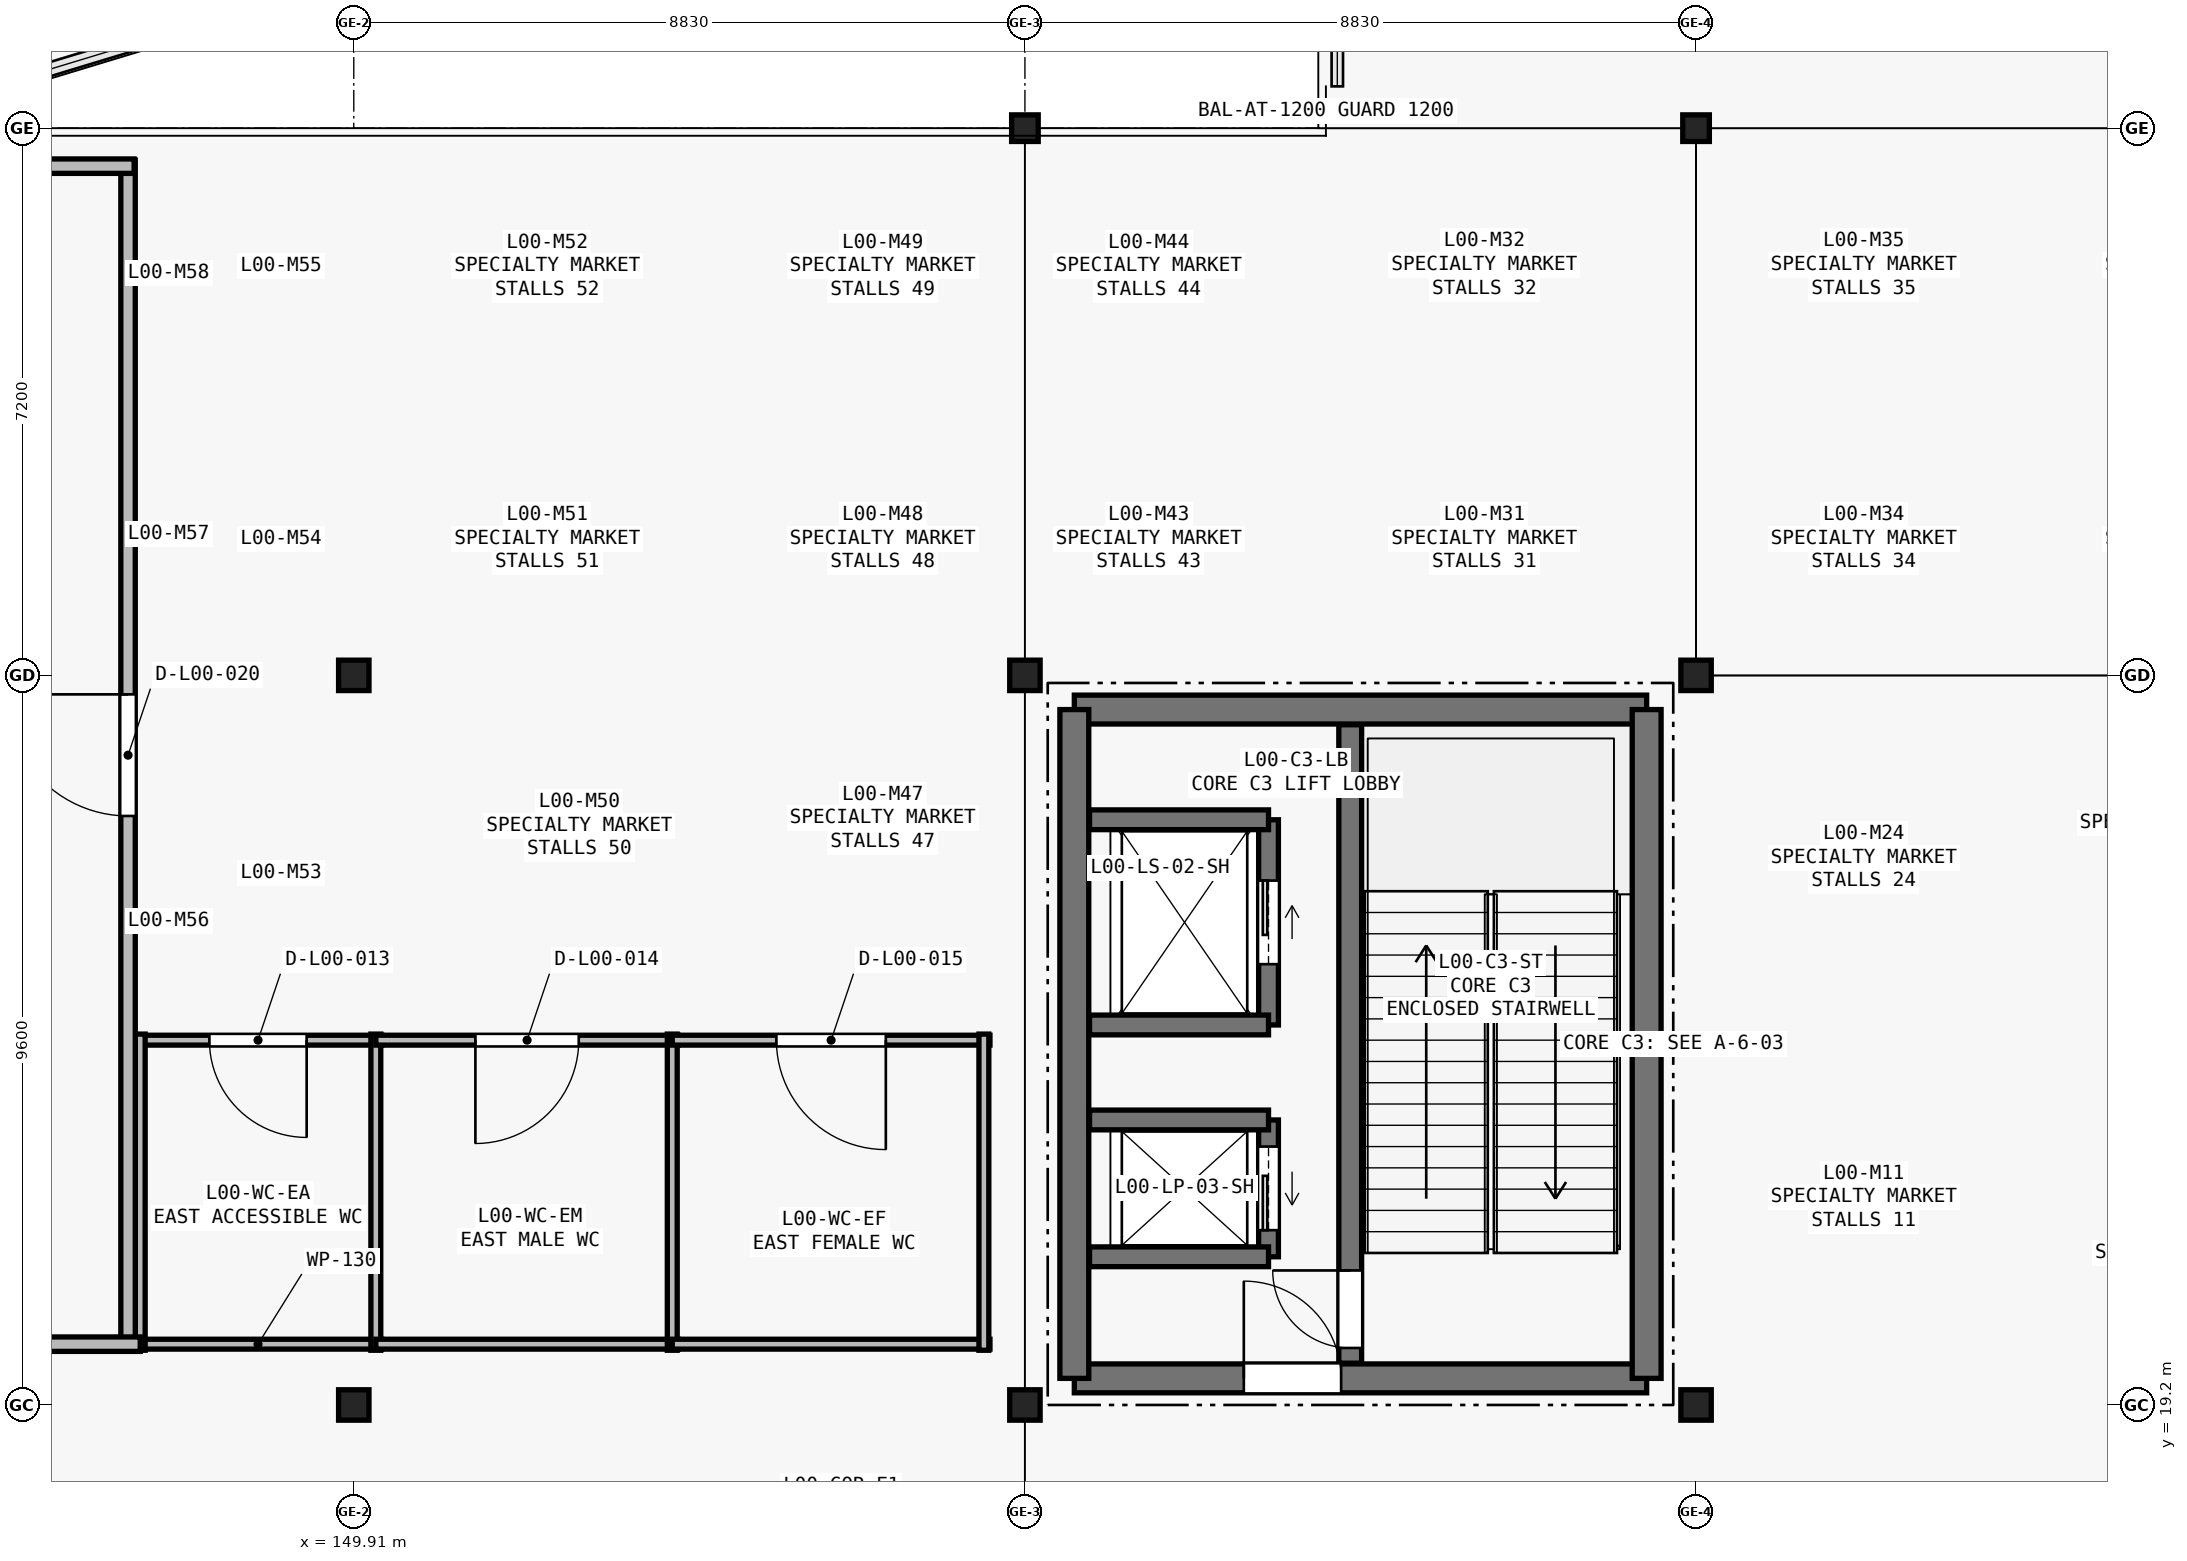
"""IFC4 building model, lengths in metres.
Left out: names, types, materials, properties, quantities, classifications, styles, units other than length and angle.
Written with IfcOpenShell. Run it as: python <this file> out.ifc"""

import sys

from ifc_helpers import new_model, si_unit, direction, frame, frame_2d, origin, origin_2d, place, context, subcontext, project, spatial, rectangle, hollow_rectangle, i_section, extrude, element, fill, save


model = new_model("IFC4")
c1 = context("Model", 3, precision=1e-05, world=origin(), true_north=direction((0.0, 1.0)))
c2 = subcontext(c1, "Body", "Model", "MODEL_VIEW")
j1 = project(units=[si_unit("LENGTHUNIT", "METRE"), si_unit("PLANEANGLEUNIT", "RADIAN")], contexts=[c1])
p1 = place(None, origin())
s1 = spatial("IfcSite", under=j1, at=p1, CompositionType="ELEMENT")
p2 = place(p1, origin())
s2 = spatial("IfcBuilding", under=s1, at=p2, CompositionType="ELEMENT")
p3 = place(p2, origin())
s3 = spatial("IfcBuildingStorey", under=s2, at=p3, CompositionType="ELEMENT", Elevation=0.0)
for number, where, z_axis, x_axis in (
    (1, (149.91, 19.2, 0.0), (0.0, 0.0, 1.0), (1.0, 0.0, 0.0)),
    (2, (149.91, 28.8, 0.0), (0.0, 0.0, 1.0), (1.0, 0.0, 0.0)),
    (3, (158.74, 19.2, 0.0), (0.0, 0.0, 1.0), (1.0, 0.0, 0.0)),
    (4, (158.74, 28.8, 0.0), (0.0, 0.0, 1.0), (1.0, 0.0, 0.0)),
):
    element("IfcColumn", number, at=place(p3, frame(where, z_axis=z_axis, x_axis=x_axis)), inside=s3, PredefinedType="COLUMN", context=c2, shape_type="SweptSolid", body=[
        extrude(i_section(OverallWidth=0.4, OverallDepth=0.4, WebThickness=0.013, FlangeThickness=0.021, FilletRadius=0.022, at=origin_2d()), origin(), (0.0, 0.0, 1.0), 6.0),
    ])
p4 = place(p3, frame((158.74, 36.0, 0.0), z_axis=(0.0, 0.0, 1.0), x_axis=(1.0, 0.0, 0.0)))
e5 = element("IfcColumn", 5, at=p4, inside=s3, PredefinedType="COLUMN", context=c2, shape_type="SweptSolid", body=[
    extrude(hollow_rectangle(XDim=0.35, YDim=0.35, WallThickness=0.012, InnerFilletRadius=0.012, OuterFilletRadius=0.016, at=origin_2d()), origin(), (0.0, 0.0, 1.0), 6.0),
])
for number, where, z_axis, x_axis in (
    (6, (167.57, 19.2, 0.0), (0.0, 0.0, 1.0), (1.0, 0.0, 0.0)),
    (7, (167.57, 28.8, 0.0), (0.0, 0.0, 1.0), (1.0, 0.0, 0.0)),
):
    element("IfcColumn", number, at=place(p3, frame(where, z_axis=z_axis, x_axis=x_axis)), inside=s3, PredefinedType="COLUMN", context=c2, shape_type="SweptSolid", body=[
        extrude(i_section(OverallWidth=0.4, OverallDepth=0.4, WebThickness=0.013, FlangeThickness=0.021, FilletRadius=0.022, at=origin_2d()), origin(), (0.0, 0.0, 1.0), 6.0),
    ])
p5 = place(p3, frame((167.57, 36.0, 0.0), z_axis=(0.0, 0.0, 1.0), x_axis=(1.0, 0.0, 0.0)))
e8 = element("IfcColumn", 8, at=p5, inside=s3, PredefinedType="COLUMN", context=c2, shape_type="SweptSolid", body=[
    extrude(i_section(OverallWidth=0.35, OverallDepth=0.35, WebThickness=0.012, FlangeThickness=0.019, FilletRadius=0.02, at=origin_2d()), origin(), (0.0, 0.0, 1.0), 6.0),
])
p6 = place(p3, frame((159.39, 19.55, 0.0), z_axis=(0.0, 0.0, 1.0), x_axis=(1.0, 0.0, 0.0)))
e9 = element("IfcWall", 9, at=p6, inside=s3, PredefinedType="SHEAR", context=c2, shape_type="SweptSolid", body=[
    extrude(rectangle(XDim=7.53, YDim=0.38, at=frame_2d((3.765, 0.0))), origin(), (0.0, 0.0, 1.0), 6.0),
])
p7 = place(p6, frame((2.23, 0.0, 0.0)))
e10 = element("IfcOpeningElement", 10, at=p7, cuts=e9, PredefinedType="OPENING", context=c2, shape_type="SweptSolid", body=[
    extrude(rectangle(XDim=1.28, YDim=2.15, at=frame_2d((0.64, 1.075))), frame((0.0, 0.2, 0.0), z_axis=(0.0, -1.0, 0.0), x_axis=(1.0, 0.0, 0.0)), (0.0, 0.0, 1.0), 0.4),
])
p8 = place(p3, frame((166.92, 28.35, 0.0), z_axis=(0.0, 0.0, 1.0), x_axis=(-1.0, 0.0, 0.0)))
e11 = element("IfcWall", 11, at=p8, inside=s3, PredefinedType="SHEAR", context=c2, shape_type="SweptSolid", body=[
    extrude(rectangle(XDim=7.53, YDim=0.38, at=frame_2d((3.765, 0.0))), origin(), (0.0, 0.0, 1.0), 6.0),
])
for number, where, z_axis, x_axis in (
    (12, (159.39, 28.35, 0.0), (0.0, 0.0, 1.0), (0.0, -1.0, 0.0)),
    (13, (166.92, 19.55, 0.0), (0.0, 0.0, 1.0), (0.0, 1.0, 0.0)),
):
    element("IfcWall", number, at=place(p3, frame(where, z_axis=z_axis, x_axis=x_axis)), inside=s3, PredefinedType="SHEAR", context=c2, shape_type="SweptSolid", body=[
        extrude(rectangle(XDim=8.8, YDim=0.38, at=frame_2d((4.4, 0.0))), origin(), (0.0, 0.0, 1.0), 6.0),
    ])
p9 = place(p3, frame((163.02, 19.75, 0.0), z_axis=(0.0, 0.0, 1.0), x_axis=(0.0, 1.0, 0.0)))
e14 = element("IfcWall", 14, at=p9, inside=s3, PredefinedType="SHEAR", context=c2, shape_type="SweptSolid", body=[
    extrude(rectangle(XDim=8.4, YDim=0.3, at=frame_2d((4.2, 0.0))), origin(), (0.0, 0.0, 1.0), 6.0),
])
p10 = place(p9, frame((0.2, 0.0, 0.0)))
e15 = element("IfcOpeningElement", 15, at=p10, cuts=e14, PredefinedType="OPENING", context=c2, shape_type="SweptSolid", body=[
    extrude(rectangle(XDim=1.02, YDim=2.1, at=frame_2d((0.51, 1.05))), frame((0.0, 0.16, 0.0), z_axis=(0.0, -1.0, 0.0), x_axis=(1.0, 0.0, 0.0)), (0.0, 0.0, 1.0), 0.32),
])
p11 = place(p3, frame((161.945, 21.15, 0.0), z_axis=(0.0, 0.0, 1.0), x_axis=(0.0, 1.0, 0.0)))
e16 = element("IfcWall", 16, at=p11, inside=s3, PredefinedType="SHEAR", context=c2, shape_type="SweptSolid", body=[
    extrude(rectangle(XDim=1.8, YDim=0.26, at=frame_2d((0.9, 0.0))), origin(), (0.0, 0.0, 1.0), 6.0),
])
p12 = place(p11, frame((0.35, 0.0, 0.0)))
e17 = element("IfcOpeningElement", 17, at=p12, cuts=e16, PredefinedType="OPENING", context=c2, shape_type="SweptSolid", body=[
    extrude(rectangle(XDim=1.1, YDim=2.15, at=frame_2d((0.55, 1.075))), frame((0.0, 0.14, 0.0), z_axis=(0.0, -1.0, 0.0), x_axis=(1.0, 0.0, 0.0)), (0.0, 0.0, 1.0), 0.28),
])
for number, where, z_axis, x_axis in (
    (18, (159.59, 21.15, 0.0), (0.0, 0.0, 1.0), (1.0, 0.0, 0.0)),
    (19, (159.59, 22.95, 0.0), (0.0, 0.0, 1.0), (1.0, 0.0, 0.0)),
):
    element("IfcWall", number, at=place(p3, frame(where, z_axis=z_axis, x_axis=x_axis)), inside=s3, PredefinedType="SHEAR", context=c2, shape_type="SweptSolid", body=[
        extrude(rectangle(XDim=2.355, YDim=0.26, at=frame_2d((1.177, 0.0))), origin(), (0.0, 0.0, 1.0), 6.0),
    ])
p13 = place(p3, frame((161.945, 24.2, 0.0), z_axis=(0.0, 0.0, 1.0), x_axis=(0.0, 1.0, 0.0)))
e20 = element("IfcWall", 20, at=p13, inside=s3, PredefinedType="SHEAR", context=c2, shape_type="SweptSolid", body=[
    extrude(rectangle(XDim=2.7, YDim=0.26, at=frame_2d((1.35, 0.0))), origin(), (0.0, 0.0, 1.0), 6.0),
])
p14 = place(p13, frame((0.8, 0.0, 0.0)))
e21 = element("IfcOpeningElement", 21, at=p14, cuts=e20, PredefinedType="OPENING", context=c2, shape_type="SweptSolid", body=[
    extrude(rectangle(XDim=1.1, YDim=2.15, at=frame_2d((0.55, 1.075))), frame((0.0, 0.14, 0.0), z_axis=(0.0, -1.0, 0.0), x_axis=(1.0, 0.0, 0.0)), (0.0, 0.0, 1.0), 0.28),
])
for number, where, z_axis, x_axis in (
    (22, (159.59, 24.2, 0.0), (0.0, 0.0, 1.0), (1.0, 0.0, 0.0)),
    (23, (159.59, 26.9, 0.0), (0.0, 0.0, 1.0), (1.0, 0.0, 0.0)),
):
    element("IfcWall", number, at=place(p3, frame(where, z_axis=z_axis, x_axis=x_axis)), inside=s3, PredefinedType="SHEAR", context=c2, shape_type="SweptSolid", body=[
        extrude(rectangle(XDim=2.355, YDim=0.26, at=frame_2d((1.177, 0.0))), origin(), (0.0, 0.0, 1.0), 6.0),
    ])
p15 = place(p3, frame((150.28, 24.0, 0.0), z_axis=(0.0, 0.0, 1.0), x_axis=(-1.0, 0.0, 0.0)))
e24 = element("IfcWall", 24, at=p15, inside=s3, PredefinedType="PARTITIONING", context=c2, shape_type="SweptSolid", body=[
    extrude(rectangle(XDim=3.26, YDim=0.13, at=frame_2d((1.63, 0.0))), origin(), (0.0, 0.0, 1.0), 5.52),
])
p16 = place(p15, frame((0.99, 0.0, 0.0)))
e25 = element("IfcOpeningElement", 25, at=p16, cuts=e24, PredefinedType="OPENING", context=c2, shape_type="SweptSolid", body=[
    extrude(rectangle(XDim=1.28, YDim=2.28, at=frame_2d((0.64, 1.14))), frame((0.0, 0.075, 0.0), z_axis=(0.0, -1.0, 0.0), x_axis=(1.0, 0.0, 0.0)), (0.0, 0.0, 1.0), 0.15),
])
p17 = place(p3, frame((147.02, 20.0, 0.0), z_axis=(0.0, 0.0, 1.0), x_axis=(1.0, 0.0, 0.0)))
e26 = element("IfcWall", 26, at=p17, inside=s3, PredefinedType="PARTITIONING", context=c2, shape_type="SweptSolid", body=[
    extrude(rectangle(XDim=3.26, YDim=0.13, at=frame_2d((1.63, 0.0))), origin(), (0.0, 0.0, 1.0), 5.52),
])
p18 = place(p3, frame((150.2, 19.92, 0.0), z_axis=(0.0, 0.0, 1.0), x_axis=(0.0, 1.0, 0.0)))
e27 = element("IfcWall", 27, at=p18, inside=s3, PredefinedType="PARTITIONING", context=c2, shape_type="SweptSolid", body=[
    extrude(rectangle(XDim=4.16, YDim=0.13, at=frame_2d((2.08, 0.0))), origin(), (0.0, 0.0, 1.0), 5.52),
])
p19 = place(p3, frame((147.1, 24.08, 0.0), z_axis=(0.0, 0.0, 1.0), x_axis=(0.0, -1.0, 0.0)))
e28 = element("IfcWall", 28, at=p19, inside=s3, PredefinedType="PARTITIONING", context=c2, shape_type="SweptSolid", body=[
    extrude(rectangle(XDim=4.16, YDim=0.13, at=frame_2d((2.08, 0.0))), origin(), (0.0, 0.0, 1.0), 5.365),
])
p20 = place(p3, frame((154.18, 24.0, 0.0), z_axis=(0.0, 0.0, 1.0), x_axis=(-1.0, 0.0, 0.0)))
e29 = element("IfcWall", 29, at=p20, inside=s3, PredefinedType="PARTITIONING", context=c2, shape_type="SweptSolid", body=[
    extrude(rectangle(XDim=3.98, YDim=0.13, at=frame_2d((1.99, 0.0))), origin(), (0.0, 0.0, 1.0), 5.52),
])
p21 = place(p20, frame((1.31, 0.0, 0.0)))
e30 = element("IfcOpeningElement", 30, at=p21, cuts=e29, PredefinedType="OPENING", context=c2, shape_type="SweptSolid", body=[
    extrude(rectangle(XDim=1.36, YDim=2.28, at=frame_2d((0.68, 1.14))), frame((0.0, 0.075, 0.0), z_axis=(0.0, -1.0, 0.0), x_axis=(1.0, 0.0, 0.0)), (0.0, 0.0, 1.0), 0.15),
])
p22 = place(p3, frame((150.2, 20.0, 0.0), z_axis=(0.0, 0.0, 1.0), x_axis=(1.0, 0.0, 0.0)))
e31 = element("IfcWall", 31, at=p22, inside=s3, PredefinedType="PARTITIONING", context=c2, shape_type="SweptSolid", body=[
    extrude(rectangle(XDim=3.98, YDim=0.13, at=frame_2d((1.99, 0.0))), origin(), (0.0, 0.0, 1.0), 5.52),
])
p23 = place(p3, frame((154.1, 19.92, 0.0), z_axis=(0.0, 0.0, 1.0), x_axis=(0.0, 1.0, 0.0)))
e32 = element("IfcWall", 32, at=p23, inside=s3, PredefinedType="PARTITIONING", context=c2, shape_type="SweptSolid", body=[
    extrude(rectangle(XDim=4.16, YDim=0.13, at=frame_2d((2.08, 0.0))), origin(), (0.0, 0.0, 1.0), 5.52),
])
p24 = place(p3, frame((158.28, 24.0, 0.0), z_axis=(0.0, 0.0, 1.0), x_axis=(-1.0, 0.0, 0.0)))
e33 = element("IfcWall", 33, at=p24, inside=s3, PredefinedType="PARTITIONING", context=c2, shape_type="SweptSolid", body=[
    extrude(rectangle(XDim=4.18, YDim=0.13, at=frame_2d((2.09, 0.0))), origin(), (0.0, 0.0, 1.0), 5.52),
])
p25 = place(p24, frame((1.37, 0.0, 0.0)))
e34 = element("IfcOpeningElement", 34, at=p25, cuts=e33, PredefinedType="OPENING", context=c2, shape_type="SweptSolid", body=[
    extrude(rectangle(XDim=1.44, YDim=2.28, at=frame_2d((0.72, 1.14))), frame((0.0, 0.075, 0.0), z_axis=(0.0, -1.0, 0.0), x_axis=(1.0, 0.0, 0.0)), (0.0, 0.0, 1.0), 0.15),
])
p26 = place(p3, frame((154.1, 20.0, 0.0), z_axis=(0.0, 0.0, 1.0), x_axis=(1.0, 0.0, 0.0)))
e35 = element("IfcWall", 35, at=p26, inside=s3, PredefinedType="PARTITIONING", context=c2, shape_type="SweptSolid", body=[
    extrude(rectangle(XDim=4.18, YDim=0.13, at=frame_2d((2.09, 0.0))), origin(), (0.0, 0.0, 1.0), 5.52),
])
p27 = place(p3, frame((158.2, 19.92, 0.0), z_axis=(0.0, 0.0, 1.0), x_axis=(0.0, 1.0, 0.0)))
e36 = element("IfcWall", 36, at=p27, inside=s3, PredefinedType="PARTITIONING", context=c2, shape_type="SweptSolid", body=[
    extrude(rectangle(XDim=4.16, YDim=0.13, at=frame_2d((2.08, 0.0))), origin(), (0.0, 0.0, 1.0), 5.52),
])
p28 = place(p3, frame((146.94, 19.92, 0.0), z_axis=(0.0, 0.0, 1.0), x_axis=(0.0, 1.0, 0.0)))
e37 = element("IfcWall", 37, at=p28, inside=s3, PredefinedType="PARTITIONING", context=c2, shape_type="SweptSolid", body=[
    extrude(rectangle(XDim=15.66, YDim=0.19, at=frame_2d((7.83, 0.0))), origin(), (0.0, 0.0, 1.0), 5.365),
])
p29 = place(p28, frame((7.03, 0.0, 0.0)))
e38 = element("IfcOpeningElement", 38, at=p29, cuts=e37, PredefinedType="OPENING", context=c2, shape_type="SweptSolid", body=[
    extrude(rectangle(XDim=1.6, YDim=2.2, at=frame_2d((0.8, 1.1))), frame((0.0, 0.105, 0.0), z_axis=(0.0, -1.0, 0.0), x_axis=(1.0, 0.0, 0.0)), (0.0, 0.0, 1.0), 0.21),
])
p30 = place(p3, frame((147.02, 35.5, 0.0), z_axis=(0.0, 0.0, 1.0), x_axis=(-1.0, 0.0, 0.0)))
e39 = element("IfcWall", 39, at=p30, inside=s3, PredefinedType="PARTITIONING", context=c2, shape_type="SweptSolid", body=[
    extrude(rectangle(XDim=5.6, YDim=0.19, at=frame_2d((2.8, 0.0))), origin(), (0.0, 0.0, 1.0), 5.52),
])
p31 = place(p3, frame((141.42, 20.0, 0.0), z_axis=(0.0, 0.0, 1.0), x_axis=(1.0, 0.0, 0.0)))
e40 = element("IfcWall", 40, at=p31, inside=s3, PredefinedType="PARTITIONING", context=c2, shape_type="SweptSolid", body=[
    extrude(rectangle(XDim=5.68, YDim=0.19, at=frame_2d((2.84, 0.0))), origin(), (0.0, 0.0, 1.0), 5.52),
])
p32 = place(p7, origin())
e41 = element("IfcDoor", 41, at=p32, inside=s3, OperationType="SINGLE_SWING_LEFT", PredefinedType="DOOR", context=c2, shape_type="SweptSolid", body=[
    extrude(rectangle(XDim=1.28, YDim=2.15, at=frame_2d((0.64, 1.075))), frame((0.0, 0.025, 0.0), z_axis=(0.0, -1.0, 0.0), x_axis=(1.0, 0.0, 0.0)), (0.0, 0.0, 1.0), 0.05),
])
fill(e10, e41)
p33 = place(p10, origin())
e42 = element("IfcDoor", 42, at=p33, inside=s3, OperationType="SINGLE_SWING_RIGHT", PredefinedType="DOOR", context=c2, shape_type="SweptSolid", body=[
    extrude(rectangle(XDim=1.02, YDim=2.1, at=frame_2d((0.51, 1.05))), frame((0.0, 0.025, 0.0), z_axis=(0.0, -1.0, 0.0), x_axis=(1.0, 0.0, 0.0)), (0.0, 0.0, 1.0), 0.05),
])
fill(e15, e42)
p34 = place(p12, origin())
e43 = element("IfcDoor", 43, at=p34, inside=s3, OperationType="SLIDING_TO_LEFT", PredefinedType="DOOR", context=c2, shape_type="SweptSolid", body=[
    extrude(rectangle(XDim=1.1, YDim=2.15, at=frame_2d((0.55, 1.075))), frame((0.0, 0.025, 0.0), z_axis=(0.0, -1.0, 0.0), x_axis=(1.0, 0.0, 0.0)), (0.0, 0.0, 1.0), 0.05),
])
fill(e17, e43)
p35 = place(p14, origin())
e44 = element("IfcDoor", 44, at=p35, inside=s3, OperationType="SLIDING_TO_RIGHT", PredefinedType="DOOR", context=c2, shape_type="SweptSolid", body=[
    extrude(rectangle(XDim=1.1, YDim=2.15, at=frame_2d((0.55, 1.075))), frame((0.0, 0.025, 0.0), z_axis=(0.0, -1.0, 0.0), x_axis=(1.0, 0.0, 0.0)), (0.0, 0.0, 1.0), 0.05),
])
fill(e21, e44)
p36 = place(p16, origin())
e45 = element("IfcDoor", 45, at=p36, inside=s3, OperationType="SINGLE_SWING_LEFT", PredefinedType="DOOR", context=c2, shape_type="SweptSolid", body=[
    extrude(rectangle(XDim=1.28, YDim=2.28, at=frame_2d((0.64, 1.14))), frame((0.0, 0.025, 0.0), z_axis=(0.0, -1.0, 0.0), x_axis=(1.0, 0.0, 0.0)), (0.0, 0.0, 1.0), 0.05),
])
fill(e25, e45)
p37 = place(p21, origin())
e46 = element("IfcDoor", 46, at=p37, inside=s3, OperationType="SINGLE_SWING_RIGHT", PredefinedType="DOOR", context=c2, shape_type="SweptSolid", body=[
    extrude(rectangle(XDim=1.36, YDim=2.28, at=frame_2d((0.68, 1.14))), frame((0.0, 0.025, 0.0), z_axis=(0.0, -1.0, 0.0), x_axis=(1.0, 0.0, 0.0)), (0.0, 0.0, 1.0), 0.05),
])
fill(e30, e46)
p38 = place(p25, origin())
e47 = element("IfcDoor", 47, at=p38, inside=s3, OperationType="SINGLE_SWING_LEFT", PredefinedType="DOOR", context=c2, shape_type="SweptSolid", body=[
    extrude(rectangle(XDim=1.44, YDim=2.28, at=frame_2d((0.72, 1.14))), frame((0.0, 0.025, 0.0), z_axis=(0.0, -1.0, 0.0), x_axis=(1.0, 0.0, 0.0)), (0.0, 0.0, 1.0), 0.05),
])
fill(e34, e47)
p39 = place(p29, origin())
e48 = element("IfcDoor", 48, at=p39, inside=s3, OperationType="SINGLE_SWING_RIGHT", PredefinedType="DOOR", context=c2, shape_type="SweptSolid", body=[
    extrude(rectangle(XDim=1.6, YDim=2.2, at=frame_2d((0.8, 1.1))), frame((0.0, 0.025, 0.0), z_axis=(0.0, -1.0, 0.0), x_axis=(1.0, 0.0, 0.0)), (0.0, 0.0, 1.0), 0.05),
])
fill(e38, e48)
save(model, sys.argv[1])
